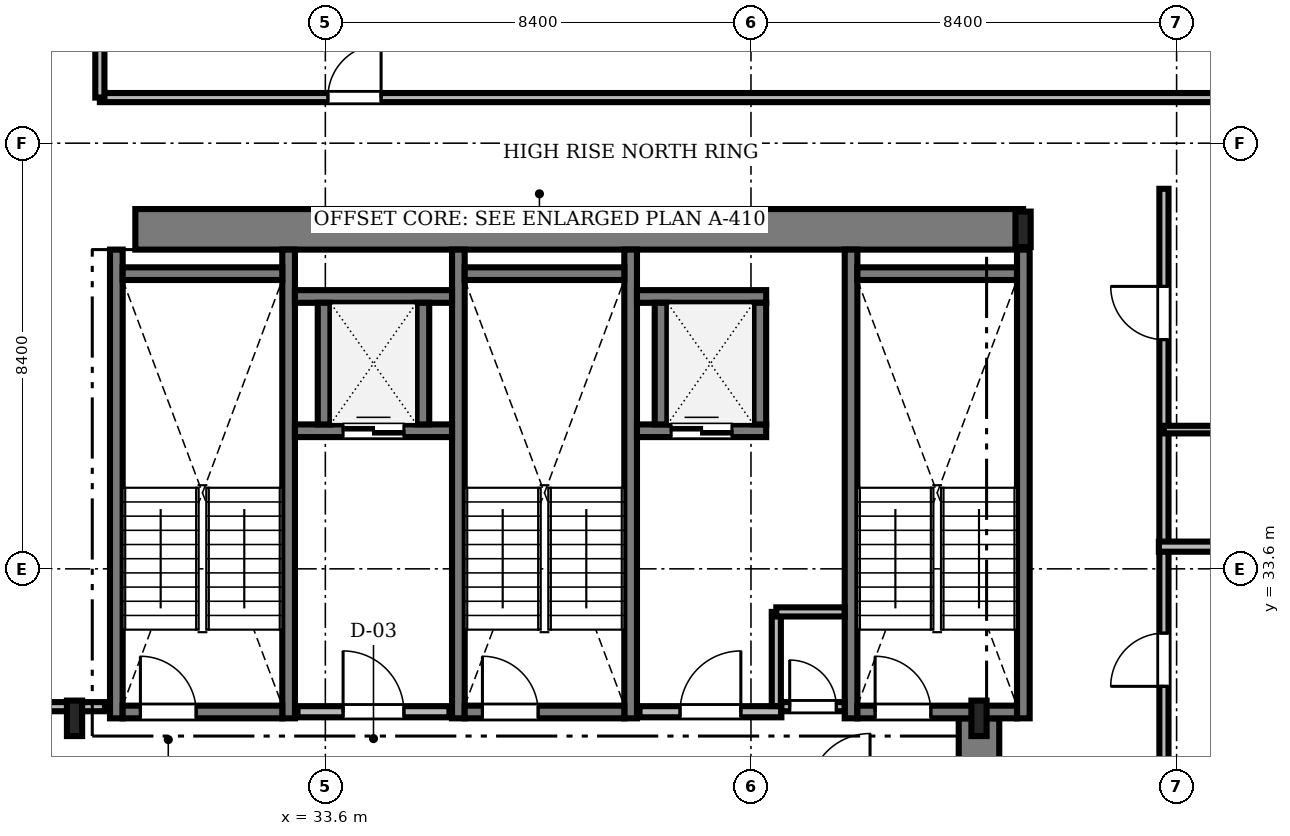
"""IFC4 building model, lengths in metres.
Left out: names, types, materials, properties, quantities, classifications, styles, units other than length and angle.
Written with IfcOpenShell. Run it as: python <this file> out.ifc"""

import sys

from ifc_helpers import new_model, si_unit, direction, frame, frame_2d, origin, origin_2d, place, context, subcontext, project, spatial, rectangle, i_section, extrude, source, transform, mapped, element, fill, save


model = new_model("IFC4")
c1 = context("Model", 3, precision=1e-05, world=origin(), true_north=direction((0.0, 1.0)))
c2 = subcontext(c1, "Body", "Model", "MODEL_VIEW")
j1 = project(units=[si_unit("LENGTHUNIT", "METRE"), si_unit("PLANEANGLEUNIT", "RADIAN")], contexts=[c1])
p1 = place(None, origin())
s1 = spatial("IfcSite", under=j1, at=p1, CompositionType="ELEMENT")
p2 = place(p1, origin())
s2 = spatial("IfcBuilding", under=s1, at=p2, CompositionType="ELEMENT")
p3 = place(p2, frame((0.0, 0.0, 184.8)))
s3 = spatial("IfcBuildingStorey", under=s2, at=p3, CompositionType="ELEMENT", Elevation=184.8)
m1 = source(origin(), c2, "Body", "SweptSolid", [
    extrude(rectangle(XDim=17.52, YDim=0.8, at=frame_2d((8.76, 0.0))), origin(), (0.0, 0.0, 1.0), 3.53),
])
p4 = place(p3, frame((29.85, 40.3, 0.0), z_axis=(0.0, 0.0, 1.0), x_axis=(1.0, 0.0, 0.0)))
e1 = element("IfcWall", 1, at=p4, inside=s3, PredefinedType="SHEAR", context=c2, shape_type="MappedRepresentation", body=[
    mapped(m1, transform((0.0, 0.0, 0.0), scale=1.0)),
])
m2 = source(origin(), c2, "Body", "SweptSolid", [
    extrude(rectangle(XDim=13.15, YDim=0.8, at=frame_2d((6.575, 0.0))), origin(), (0.0, 0.0, 1.0), 3.53),
])
p5 = place(p3, frame((46.5, 17.5, 0.0), z_axis=(0.0, 0.0, 1.0), x_axis=(0.0, 1.0, 0.0)))
e2 = element("IfcWall", 2, at=p5, inside=s3, PredefinedType="SHEAR", context=c2, shape_type="MappedRepresentation", body=[
    mapped(m2, transform((0.0, 0.0, 0.0), scale=1.0)),
])
m3 = source(origin(), c2, "Body", "SweptSolid", [
    extrude(i_section(OverallWidth=0.3, OverallDepth=0.7, WebThickness=0.017, FlangeThickness=0.032, FilletRadius=0.027, at=origin_2d()), origin(), (0.0, 0.0, 1.0), 3.53),
])
for number, where, z_axis, x_axis in (
    (3, (28.65, 30.65, 0.0), (0.0, 0.0, 1.0), (1.0, 0.0, 0.0)),
    (4, (46.5, 30.65, 0.0), (0.0, 0.0, 1.0), (1.0, 0.0, 0.0)),
    (5, (47.37, 40.3, 0.0), (0.0, 0.0, 1.0), (1.0, 0.0, 0.0)),
):
    element("IfcColumn", number, at=place(p3, frame(where, z_axis=z_axis, x_axis=x_axis)), inside=s3, PredefinedType="COLUMN", context=c2, shape_type="MappedRepresentation", body=[
        mapped(m3, transform((0.0, 0.0, 0.0), scale=1.0)),
    ])
m4 = source(origin(), c2, "Body", "SweptSolid", [
    extrude(rectangle(XDim=9.25, YDim=0.25, at=frame_2d((4.625, 0.0))), origin(), (0.0, 0.0, 1.0), 3.55),
])
for number, where, z_axis, x_axis in (
    (6, (29.475, 30.65, 0.0), (0.0, 0.0, 1.0), (0.0, 1.0, 0.0)),
    (7, (32.875, 30.65, 0.0), (0.0, 0.0, 1.0), (0.0, 1.0, 0.0)),
):
    element("IfcWall", number, at=place(p3, frame(where, z_axis=z_axis, x_axis=x_axis)), inside=s3, PredefinedType="SOLIDWALL", context=c2, shape_type="MappedRepresentation", body=[
        mapped(m4, transform((0.0, 0.0, 0.0), scale=1.0)),
    ])
m5 = source(origin(), c2, "Body", "SweptSolid", [
    extrude(rectangle(XDim=3.15, YDim=0.25, at=frame_2d((1.575, 0.0))), origin(), (0.0, 0.0, 1.0), 3.55),
])
p6 = place(p3, frame((29.6, 39.425, 0.0), z_axis=(0.0, 0.0, 1.0), x_axis=(1.0, 0.0, 0.0)))
e8 = element("IfcWall", 8, at=p6, inside=s3, PredefinedType="SOLIDWALL", context=c2, shape_type="MappedRepresentation", body=[
    mapped(m5, transform((0.0, 0.0, 0.0), scale=1.0)),
])
p7 = place(p3, frame((29.6, 30.775, 0.0), z_axis=(0.0, 0.0, 1.0), x_axis=(1.0, 0.0, 0.0)))
e9 = element("IfcWall", 9, at=p7, inside=s3, PredefinedType="SOLIDWALL", context=c2, shape_type="MappedRepresentation", body=[
    mapped(m5, transform((0.0, 0.0, 0.0), scale=1.0)),
])
m6 = source(origin(), c2, "Body", "SweptSolid", [
    extrude(rectangle(XDim=1.1, YDim=2.2, at=frame_2d((0.55, 1.1))), frame((0.0, 0.135, 0.0), z_axis=(0.0, -1.0, 0.0), x_axis=(1.0, 0.0, 0.0)), (0.0, 0.0, 1.0), 0.27),
])
p8 = place(p7, frame((0.35, 0.0, 0.0)))
e10 = element("IfcOpeningElement", 10, at=p8, cuts=e9, PredefinedType="OPENING", context=c2, shape_type="MappedRepresentation", body=[
    mapped(m6, transform((0.0, 0.0, 0.0), scale=1.0)),
])
for number, where, z_axis, x_axis in (
    (11, (36.225, 30.65, 0.0), (0.0, 0.0, 1.0), (0.0, 1.0, 0.0)),
    (12, (39.625, 30.65, 0.0), (0.0, 0.0, 1.0), (0.0, 1.0, 0.0)),
):
    element("IfcWall", number, at=place(p3, frame(where, z_axis=z_axis, x_axis=x_axis)), inside=s3, PredefinedType="SOLIDWALL", context=c2, shape_type="MappedRepresentation", body=[
        mapped(m4, transform((0.0, 0.0, 0.0), scale=1.0)),
    ])
p9 = place(p3, frame((36.35, 39.425, 0.0), z_axis=(0.0, 0.0, 1.0), x_axis=(1.0, 0.0, 0.0)))
e13 = element("IfcWall", 13, at=p9, inside=s3, PredefinedType="SOLIDWALL", context=c2, shape_type="MappedRepresentation", body=[
    mapped(m5, transform((0.0, 0.0, 0.0), scale=1.0)),
])
p10 = place(p3, frame((36.35, 30.775, 0.0), z_axis=(0.0, 0.0, 1.0), x_axis=(1.0, 0.0, 0.0)))
e14 = element("IfcWall", 14, at=p10, inside=s3, PredefinedType="SOLIDWALL", context=c2, shape_type="MappedRepresentation", body=[
    mapped(m5, transform((0.0, 0.0, 0.0), scale=1.0)),
])
p11 = place(p10, frame((0.35, 0.0, 0.0)))
e15 = element("IfcOpeningElement", 15, at=p11, cuts=e14, PredefinedType="OPENING", context=c2, shape_type="MappedRepresentation", body=[
    mapped(m6, transform((0.0, 0.0, 0.0), scale=1.0)),
])
for number, where, z_axis, x_axis in (
    (16, (43.975, 30.65, 0.0), (0.0, 0.0, 1.0), (0.0, 1.0, 0.0)),
    (17, (47.375, 30.65, 0.0), (0.0, 0.0, 1.0), (0.0, 1.0, 0.0)),
):
    element("IfcWall", number, at=place(p3, frame(where, z_axis=z_axis, x_axis=x_axis)), inside=s3, PredefinedType="SOLIDWALL", context=c2, shape_type="MappedRepresentation", body=[
        mapped(m4, transform((0.0, 0.0, 0.0), scale=1.0)),
    ])
p12 = place(p3, frame((44.1, 39.425, 0.0), z_axis=(0.0, 0.0, 1.0), x_axis=(1.0, 0.0, 0.0)))
e18 = element("IfcWall", 18, at=p12, inside=s3, PredefinedType="SOLIDWALL", context=c2, shape_type="MappedRepresentation", body=[
    mapped(m5, transform((0.0, 0.0, 0.0), scale=1.0)),
])
p13 = place(p3, frame((44.1, 30.775, 0.0), z_axis=(0.0, 0.0, 1.0), x_axis=(1.0, 0.0, 0.0)))
e19 = element("IfcWall", 19, at=p13, inside=s3, PredefinedType="SOLIDWALL", context=c2, shape_type="MappedRepresentation", body=[
    mapped(m5, transform((0.0, 0.0, 0.0), scale=1.0)),
])
p14 = place(p13, frame((0.35, 0.0, 0.0)))
e20 = element("IfcOpeningElement", 20, at=p14, cuts=e19, PredefinedType="OPENING", context=c2, shape_type="MappedRepresentation", body=[
    mapped(m6, transform((0.0, 0.0, 0.0), scale=1.0)),
])
m7 = source(origin(), c2, "Body", "SweptSolid", [
    extrude(rectangle(XDim=3.0, YDim=0.22, at=frame_2d((1.5, 0.0))), origin(), (0.0, 0.0, 1.0), 3.53),
])
p15 = place(p3, frame((33.05, 30.78, 0.0), z_axis=(0.0, 0.0, 1.0), x_axis=(1.0, 0.0, 0.0)))
e21 = element("IfcWall", 21, at=p15, inside=s3, PredefinedType="SOLIDWALL", context=c2, shape_type="MappedRepresentation", body=[
    mapped(m7, transform((0.0, 0.0, 0.0), scale=1.0)),
])
m8 = source(origin(), c2, "Body", "SweptSolid", [
    extrude(rectangle(XDim=1.2, YDim=2.2, at=frame_2d((0.6, 1.1))), frame((0.0, 0.12, 0.0), z_axis=(0.0, -1.0, 0.0), x_axis=(1.0, 0.0, 0.0)), (0.0, 0.0, 1.0), 0.24),
])
p16 = place(p15, frame((0.9, 0.0, 0.0)))
e22 = element("IfcOpeningElement", 22, at=p16, cuts=e21, PredefinedType="OPENING", context=c2, shape_type="MappedRepresentation", body=[
    mapped(m8, transform((0.0, 0.0, 0.0), scale=1.0)),
])
m9 = source(origin(), c2, "Body", "SweptSolid", [
    extrude(rectangle(XDim=2.8, YDim=0.22, at=frame_2d((1.4, 0.0))), origin(), (0.0, 0.0, 1.0), 3.53),
])
p17 = place(p3, frame((39.8, 30.78, 0.0), z_axis=(0.0, 0.0, 1.0), x_axis=(1.0, 0.0, 0.0)))
e23 = element("IfcWall", 23, at=p17, inside=s3, PredefinedType="SOLIDWALL", context=c2, shape_type="MappedRepresentation", body=[
    mapped(m9, transform((0.0, 0.0, 0.0), scale=1.0)),
])
p18 = place(p17, frame((0.8, 0.0, 0.0)))
e24 = element("IfcOpeningElement", 24, at=p18, cuts=e23, PredefinedType="OPENING", context=c2, shape_type="MappedRepresentation", body=[
    mapped(m8, transform((0.0, 0.0, 0.0), scale=1.0)),
])
m10 = source(origin(), c2, "Body", "SweptSolid", [
    extrude(rectangle(XDim=3.1, YDim=0.25, at=frame_2d((1.55, 0.0))), origin(), (0.0, 0.0, 1.0), 3.53),
])
p19 = place(p3, frame((33.0, 36.325, 0.0), z_axis=(0.0, 0.0, 1.0), x_axis=(1.0, 0.0, 0.0)))
e25 = element("IfcWall", 25, at=p19, inside=s3, PredefinedType="SOLIDWALL", context=c2, shape_type="MappedRepresentation", body=[
    mapped(m10, transform((0.0, 0.0, 0.0), scale=1.0)),
])
m11 = source(origin(), c2, "Body", "SweptSolid", [
    extrude(rectangle(XDim=1.2, YDim=2.25, at=frame_2d((0.6, 1.125))), frame((0.0, 0.135, 0.0), z_axis=(0.0, -1.0, 0.0), x_axis=(1.0, 0.0, 0.0)), (0.0, 0.0, 1.0), 0.27),
])
p20 = place(p19, frame((0.95, 0.0, 0.0)))
e26 = element("IfcOpeningElement", 26, at=p20, cuts=e25, PredefinedType="OPENING", context=c2, shape_type="MappedRepresentation", body=[
    mapped(m11, transform((0.0, 0.0, 0.0), scale=1.0)),
])
p21 = place(p3, frame((33.0, 38.975, 0.0), z_axis=(0.0, 0.0, 1.0), x_axis=(1.0, 0.0, 0.0)))
e27 = element("IfcWall", 27, at=p21, inside=s3, PredefinedType="SOLIDWALL", context=c2, shape_type="MappedRepresentation", body=[
    mapped(m10, transform((0.0, 0.0, 0.0), scale=1.0)),
])
m12 = source(origin(), c2, "Body", "SweptSolid", [
    extrude(rectangle(XDim=2.4, YDim=0.25, at=frame_2d((1.2, 0.0))), origin(), (0.0, 0.0, 1.0), 3.53),
])
for number, where, z_axis, x_axis in (
    (28, (33.575, 36.45, 0.0), (0.0, 0.0, 1.0), (0.0, 1.0, 0.0)),
    (29, (35.525, 36.45, 0.0), (0.0, 0.0, 1.0), (0.0, 1.0, 0.0)),
):
    element("IfcWall", number, at=place(p3, frame(where, z_axis=z_axis, x_axis=x_axis)), inside=s3, PredefinedType="SOLIDWALL", context=c2, shape_type="MappedRepresentation", body=[
        mapped(m12, transform((0.0, 0.0, 0.0), scale=1.0)),
    ])
m13 = source(origin(), c2, "Body", "SweptSolid", [
    extrude(rectangle(XDim=2.55, YDim=0.25, at=frame_2d((1.275, 0.0))), origin(), (0.0, 0.0, 1.0), 3.53),
])
p22 = place(p3, frame((39.75, 36.325, 0.0), z_axis=(0.0, 0.0, 1.0), x_axis=(1.0, 0.0, 0.0)))
e30 = element("IfcWall", 30, at=p22, inside=s3, PredefinedType="SOLIDWALL", context=c2, shape_type="MappedRepresentation", body=[
    mapped(m13, transform((0.0, 0.0, 0.0), scale=1.0)),
])
p23 = place(p22, frame((0.675, 0.0, 0.0)))
e31 = element("IfcOpeningElement", 31, at=p23, cuts=e30, PredefinedType="OPENING", context=c2, shape_type="MappedRepresentation", body=[
    mapped(m11, transform((0.0, 0.0, 0.0), scale=1.0)),
])
p24 = place(p3, frame((39.75, 38.975, 0.0), z_axis=(0.0, 0.0, 1.0), x_axis=(1.0, 0.0, 0.0)))
e32 = element("IfcWall", 32, at=p24, inside=s3, PredefinedType="SOLIDWALL", context=c2, shape_type="MappedRepresentation", body=[
    mapped(m13, transform((0.0, 0.0, 0.0), scale=1.0)),
])
for number, where, z_axis, x_axis in (
    (33, (40.225, 36.45, 0.0), (0.0, 0.0, 1.0), (0.0, 1.0, 0.0)),
    (34, (42.175, 36.45, 0.0), (0.0, 0.0, 1.0), (0.0, 1.0, 0.0)),
):
    element("IfcWall", number, at=place(p3, frame(where, z_axis=z_axis, x_axis=x_axis)), inside=s3, PredefinedType="SOLIDWALL", context=c2, shape_type="MappedRepresentation", body=[
        mapped(m12, transform((0.0, 0.0, 0.0), scale=1.0)),
    ])
m14 = source(origin(), c2, "Body", "SweptSolid", [
    extrude(rectangle(XDim=28.428, YDim=0.18, at=frame_2d((14.214, 0.0))), origin(), (0.0, 0.0, 1.0), 2.772),
])
p25 = place(p3, frame((29.15, 42.9, 0.0), z_axis=(0.0, 0.0, 1.0), x_axis=(1.0, 0.0, 0.0)))
e35 = element("IfcWall", 35, at=p25, inside=s3, PredefinedType="PARTITIONING", context=c2, shape_type="MappedRepresentation", body=[
    mapped(m14, transform((0.0, 0.0, 0.0), scale=1.0)),
])
m15 = source(origin(), c2, "Body", "SweptSolid", [
    extrude(rectangle(XDim=1.05, YDim=2.2, at=frame_2d((0.525, 1.1))), frame((0.0, 0.1, 0.0), z_axis=(0.0, -1.0, 0.0), x_axis=(1.0, 0.0, 0.0)), (0.0, 0.0, 1.0), 0.2),
])
p26 = place(p25, frame((4.5, 0.0, 0.0)))
e36 = element("IfcOpeningElement", 36, at=p26, cuts=e35, PredefinedType="OPENING", context=c2, shape_type="MappedRepresentation", body=[
    mapped(m15, transform((0.0, 0.0, 0.0), scale=1.0)),
])
m16 = source(origin(), c2, "Body", "SweptSolid", [
    extrude(rectangle(XDim=27.59, YDim=0.18, at=frame_2d((13.795, 0.0))), origin(), (0.0, 0.0, 1.0), 2.972),
])
p27 = place(p3, frame((50.15, 13.51, 0.0), z_axis=(0.0, 0.0, 1.0), x_axis=(0.0, 1.0, 0.0)))
e37 = element("IfcWall", 37, at=p27, inside=s3, PredefinedType="PARTITIONING", context=c2, shape_type="MappedRepresentation", body=[
    mapped(m16, transform((0.0, 0.0, 0.0), scale=1.0)),
])
p28 = place(p27, frame((4.086, 0.0, 0.0)))
e38 = element("IfcOpeningElement", 38, at=p28, cuts=e37, PredefinedType="OPENING", context=c2, shape_type="MappedRepresentation", body=[
    mapped(m15, transform((0.0, 0.0, 0.0), scale=1.0)),
])
p29 = place(p27, frame((9.744, 0.0, 0.0)))
e39 = element("IfcOpeningElement", 39, at=p29, cuts=e37, PredefinedType="OPENING", context=c2, shape_type="MappedRepresentation", body=[
    mapped(m15, transform((0.0, 0.0, 0.0), scale=1.0)),
])
p30 = place(p27, frame((17.771, 0.0, 0.0)))
e40 = element("IfcOpeningElement", 40, at=p30, cuts=e37, PredefinedType="OPENING", context=c2, shape_type="MappedRepresentation", body=[
    mapped(m15, transform((0.0, 0.0, 0.0), scale=1.0)),
])
p31 = place(p27, frame((24.614, 0.0, 0.0)))
e41 = element("IfcOpeningElement", 41, at=p31, cuts=e37, PredefinedType="OPENING", context=c2, shape_type="MappedRepresentation", body=[
    mapped(m15, transform((0.0, 0.0, 0.0), scale=1.0)),
])
m17 = source(origin(), c2, "Body", "SweptSolid", [
    extrude(rectangle(XDim=17.828, YDim=0.18, at=frame_2d((8.914, 0.0))), origin(), (0.0, 0.0, 1.0), 2.772),
])
p32 = place(p3, frame((11.422, 30.88, 0.0), z_axis=(0.0, 0.0, 1.0), x_axis=(1.0, 0.0, 0.0)))
e42 = element("IfcWall", 42, at=p32, inside=s3, PredefinedType="PARTITIONING", context=c2, shape_type="MappedRepresentation", body=[
    mapped(m17, transform((0.0, 0.0, 0.0), scale=1.0)),
])
p33 = place(p32, frame((10.778, 0.0, 0.0)))
e43 = element("IfcOpeningElement", 43, at=p33, cuts=e42, PredefinedType="OPENING", context=c2, shape_type="MappedRepresentation", body=[
    mapped(m15, transform((0.0, 0.0, 0.0), scale=1.0)),
])
m18 = source(origin(), c2, "Body", "SweptSolid", [
    extrude(rectangle(XDim=1.248, YDim=0.18, at=frame_2d((0.624, 0.0))), origin(), (0.0, 0.0, 1.0), 3.53),
])
p34 = place(p3, frame((42.6, 30.88, 0.0), z_axis=(0.0, 0.0, 1.0), x_axis=(1.0, 0.0, 0.0)))
e44 = element("IfcWall", 44, at=p34, inside=s3, PredefinedType="PARTITIONING", context=c2, shape_type="MappedRepresentation", body=[
    mapped(m18, transform((0.0, 0.0, 0.0), scale=1.0)),
])
m19 = source(origin(), c2, "Body", "SweptSolid", [
    extrude(rectangle(XDim=0.92, YDim=2.1, at=frame_2d((0.46, 1.05))), frame((0.0, 0.1, 0.0), z_axis=(0.0, -1.0, 0.0), x_axis=(1.0, 0.0, 0.0)), (0.0, 0.0, 1.0), 0.2),
])
p35 = place(p34, frame((0.164, 0.0, 0.0)))
e45 = element("IfcOpeningElement", 45, at=p35, cuts=e44, PredefinedType="OPENING", context=c2, shape_type="MappedRepresentation", body=[
    mapped(m19, transform((0.0, 0.0, 0.0), scale=1.0)),
])
m20 = source(origin(), c2, "Body", "SweptSolid", [
    extrude(rectangle(XDim=7.528, YDim=0.2, at=frame_2d((3.764, 0.0))), origin(), (0.0, 0.0, 1.0), 2.772),
])
p36 = place(p3, frame((50.05, 34.038, 0.0), z_axis=(0.0, 0.0, 1.0), x_axis=(1.0, 0.0, 0.0)))
e46 = element("IfcWall", 46, at=p36, inside=s3, PredefinedType="PARTITIONING", context=c2, shape_type="MappedRepresentation", body=[
    mapped(m20, transform((0.0, 0.0, 0.0), scale=1.0)),
])
m21 = source(origin(), c2, "Body", "SweptSolid", [
    extrude(rectangle(XDim=5.378, YDim=0.18, at=frame_2d((2.689, 0.0))), origin(), (0.0, 0.0, 1.0), 2.772),
])
p37 = place(p3, frame((29.15, 42.9, 0.0), z_axis=(0.0, 0.0, 1.0), x_axis=(0.0, 1.0, 0.0)))
e47 = element("IfcWall", 47, at=p37, inside=s3, PredefinedType="PARTITIONING", context=c2, shape_type="MappedRepresentation", body=[
    mapped(m21, transform((0.0, 0.0, 0.0), scale=1.0)),
])
m22 = source(origin(), c2, "Body", "SweptSolid", [
    extrude(rectangle(XDim=2.36, YDim=0.15, at=frame_2d((1.18, 0.0))), origin(), (0.0, 0.0, 1.0), 3.53),
])
p38 = place(p3, frame((50.15, 36.348, 0.0), z_axis=(0.0, 0.0, 1.0), x_axis=(1.0, 0.0, 0.0)))
e48 = element("IfcWall", 48, at=p38, inside=s3, PredefinedType="PARTITIONING", context=c2, shape_type="MappedRepresentation", body=[
    mapped(m22, transform((0.0, 0.0, 0.0), scale=1.0)),
])
m23 = source(origin(), c2, "Body", "SweptSolid", [
    extrude(rectangle(XDim=1.858, YDim=0.18, at=frame_2d((0.929, 0.0))), origin(), (0.0, 0.0, 1.0), 3.53),
])
p39 = place(p3, frame((42.5, 30.892, 0.0), z_axis=(0.0, 0.0, 1.0), x_axis=(0.0, 1.0, 0.0)))
e49 = element("IfcWall", 49, at=p39, inside=s3, PredefinedType="PARTITIONING", context=c2, shape_type="MappedRepresentation", body=[
    mapped(m23, transform((0.0, 0.0, 0.0), scale=1.0)),
])
m24 = source(origin(), c2, "Body", "SweptSolid", [
    extrude(rectangle(XDim=1.348, YDim=0.18, at=frame_2d((0.674, 0.0))), origin(), (0.0, 0.0, 1.0), 3.53),
])
p40 = place(p3, frame((42.5, 32.75, 0.0), z_axis=(0.0, 0.0, 1.0), x_axis=(1.0, 0.0, 0.0)))
e50 = element("IfcWall", 50, at=p40, inside=s3, PredefinedType="PARTITIONING", context=c2, shape_type="MappedRepresentation", body=[
    mapped(m24, transform((0.0, 0.0, 0.0), scale=1.0)),
])
m25 = source(origin(), c2, "Body", "SweptSolid", [
    extrude(rectangle(XDim=1.1, YDim=2.2, at=frame_2d((0.55, 1.1))), frame((0.0, 0.025, 0.0), z_axis=(0.0, -1.0, 0.0), x_axis=(1.0, 0.0, 0.0)), (0.0, 0.0, 1.0), 0.05),
])
p41 = place(p8, origin())
e51 = element("IfcDoor", 51, at=p41, inside=s3, OperationType="SINGLE_SWING_LEFT", PredefinedType="DOOR", context=c2, shape_type="MappedRepresentation", body=[
    mapped(m25, transform((0.0, 0.0, 0.0), scale=1.0)),
])
fill(e10, e51)
p42 = place(p11, origin())
e52 = element("IfcDoor", 52, at=p42, inside=s3, OperationType="SINGLE_SWING_LEFT", PredefinedType="DOOR", context=c2, shape_type="MappedRepresentation", body=[
    mapped(m25, transform((0.0, 0.0, 0.0), scale=1.0)),
])
fill(e15, e52)
p43 = place(p14, origin())
e53 = element("IfcDoor", 53, at=p43, inside=s3, OperationType="SINGLE_SWING_LEFT", PredefinedType="DOOR", context=c2, shape_type="MappedRepresentation", body=[
    mapped(m25, transform((0.0, 0.0, 0.0), scale=1.0)),
])
fill(e20, e53)
m26 = source(origin(), c2, "Body", "SweptSolid", [
    extrude(rectangle(XDim=1.2, YDim=2.2, at=frame_2d((0.6, 1.1))), frame((0.0, 0.025, 0.0), z_axis=(0.0, -1.0, 0.0), x_axis=(1.0, 0.0, 0.0)), (0.0, 0.0, 1.0), 0.05),
])
p44 = place(p16, origin())
e54 = element("IfcDoor", 54, at=p44, inside=s3, OperationType="SINGLE_SWING_LEFT", PredefinedType="DOOR", context=c2, shape_type="MappedRepresentation", body=[
    mapped(m26, transform((0.0, 0.0, 0.0), scale=1.0)),
])
fill(e22, e54)
p45 = place(p18, origin())
e55 = element("IfcDoor", 55, at=p45, inside=s3, OperationType="SINGLE_SWING_RIGHT", PredefinedType="DOOR", context=c2, shape_type="MappedRepresentation", body=[
    mapped(m26, transform((0.0, 0.0, 0.0), scale=1.0)),
])
fill(e24, e55)
m27 = source(origin(), c2, "Body", "SweptSolid", [
    extrude(rectangle(XDim=1.2, YDim=2.25, at=frame_2d((0.6, 1.125))), frame((0.0, 0.025, 0.0), z_axis=(0.0, -1.0, 0.0), x_axis=(1.0, 0.0, 0.0)), (0.0, 0.0, 1.0), 0.05),
])
p46 = place(p20, origin())
e56 = element("IfcDoor", 56, at=p46, inside=s3, OperationType="DOUBLE_DOOR_SLIDING", PredefinedType="DOOR", context=c2, shape_type="MappedRepresentation", body=[
    mapped(m27, transform((0.0, 0.0, 0.0), scale=1.0)),
])
fill(e26, e56)
p47 = place(p23, origin())
e57 = element("IfcDoor", 57, at=p47, inside=s3, OperationType="DOUBLE_DOOR_SLIDING", PredefinedType="DOOR", context=c2, shape_type="MappedRepresentation", body=[
    mapped(m27, transform((0.0, 0.0, 0.0), scale=1.0)),
])
fill(e31, e57)
m28 = source(origin(), c2, "Body", "SweptSolid", [
    extrude(rectangle(XDim=1.05, YDim=2.2, at=frame_2d((0.525, 1.1))), frame((0.0, 0.025, 0.0), z_axis=(0.0, -1.0, 0.0), x_axis=(1.0, 0.0, 0.0)), (0.0, 0.0, 1.0), 0.05),
])
p48 = place(p26, origin())
e58 = element("IfcDoor", 58, at=p48, inside=s3, OperationType="SINGLE_SWING_RIGHT", PredefinedType="DOOR", context=c2, shape_type="MappedRepresentation", body=[
    mapped(m28, transform((0.0, 0.0, 0.0), scale=1.0)),
])
fill(e36, e58)
p49 = place(p30, origin())
e59 = element("IfcDoor", 59, at=p49, inside=s3, OperationType="SINGLE_SWING_LEFT", PredefinedType="DOOR", context=c2, shape_type="MappedRepresentation", body=[
    mapped(m28, transform((0.0, 0.0, 0.0), scale=1.0)),
])
fill(e40, e59)
p50 = place(p31, origin())
e60 = element("IfcDoor", 60, at=p50, inside=s3, OperationType="SINGLE_SWING_RIGHT", PredefinedType="DOOR", context=c2, shape_type="MappedRepresentation", body=[
    mapped(m28, transform((0.0, 0.0, 0.0), scale=1.0)),
])
fill(e41, e60)
m29 = source(origin(), c2, "Body", "SweptSolid", [
    extrude(rectangle(XDim=0.92, YDim=2.1, at=frame_2d((0.46, 1.05))), frame((0.0, 0.025, 0.0), z_axis=(0.0, -1.0, 0.0), x_axis=(1.0, 0.0, 0.0)), (0.0, 0.0, 1.0), 0.05),
])
p51 = place(p35, origin())
e61 = element("IfcDoor", 61, at=p51, inside=s3, OperationType="SINGLE_SWING_LEFT", PredefinedType="DOOR", context=c2, shape_type="MappedRepresentation", body=[
    mapped(m29, transform((0.0, 0.0, 0.0), scale=1.0)),
])
fill(e45, e61)
save(model, sys.argv[1])
